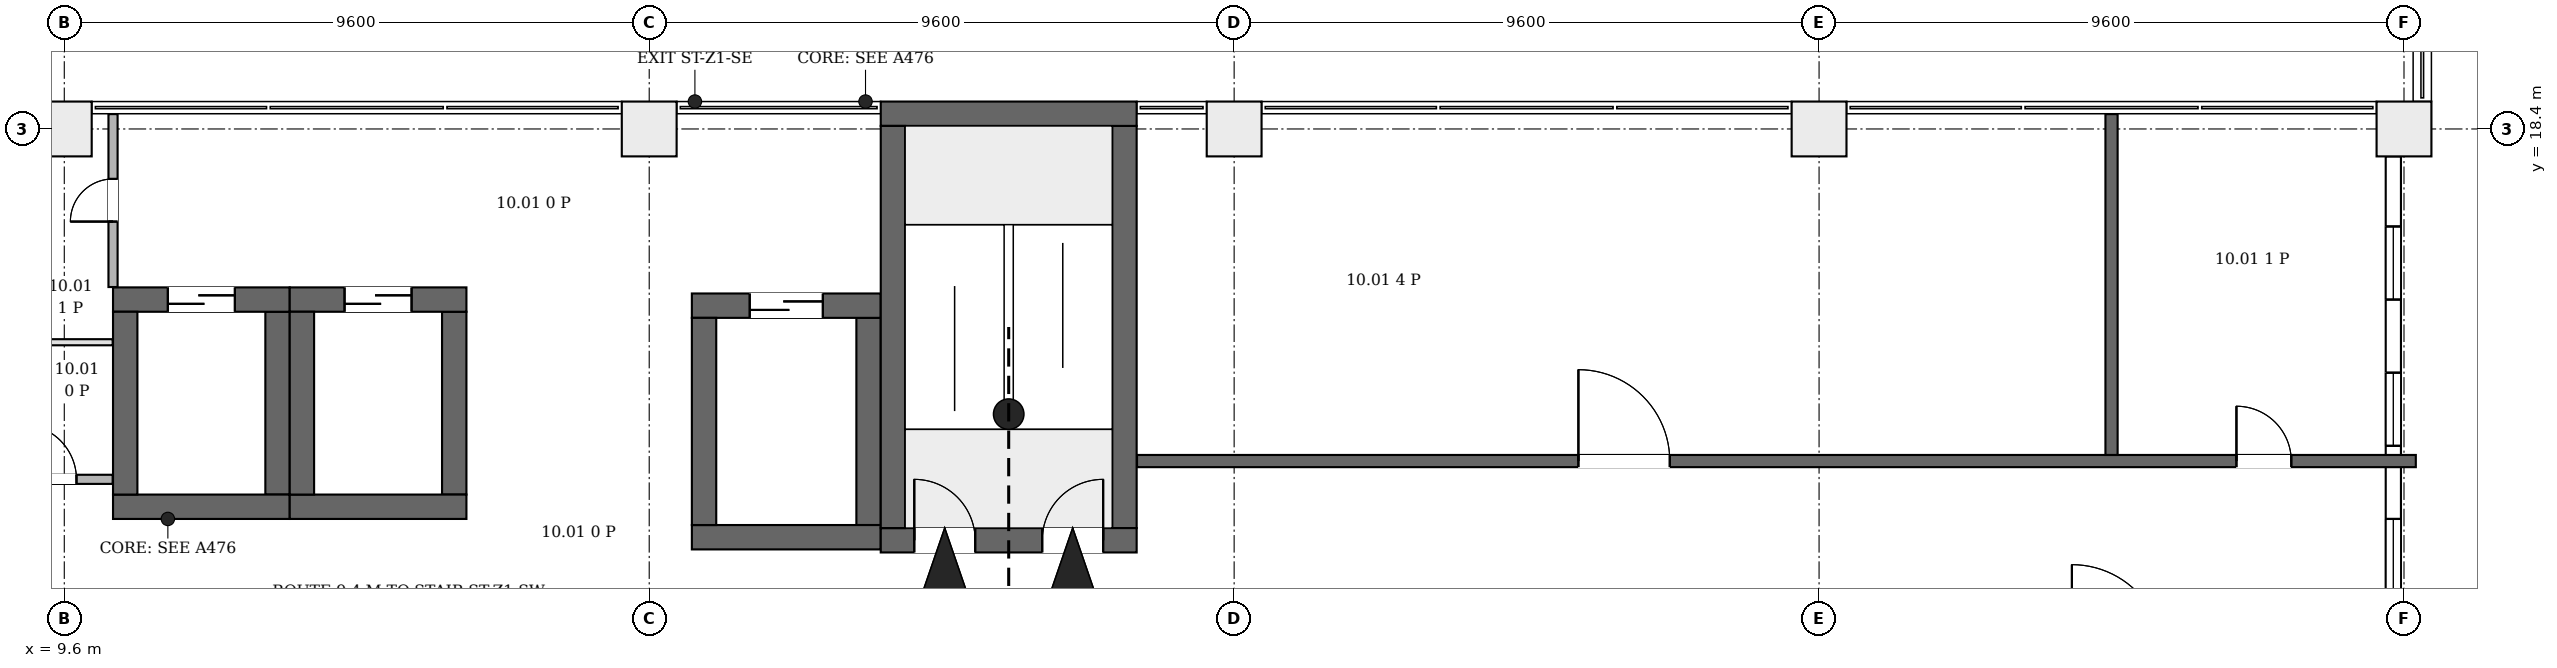
"""IFC4 building model, lengths in metres.
Left out: names, types, materials, properties, quantities, classifications, styles, units other than length and angle.
Written with IfcOpenShell. Run it as: python <this file> out.ifc"""

import sys

from ifc_helpers import new_model, si_unit, direction, frame, frame_2d, origin, origin_2d, place, context, subcontext, project, spatial, rectangle, extrude, element, fill, save


model = new_model("IFC4")
c1 = context("Model", 3, precision=1e-05, world=origin(), true_north=direction((0.0, 1.0)))
c2 = subcontext(c1, "Body", "Model", "MODEL_VIEW")
j1 = project(units=[si_unit("LENGTHUNIT", "METRE"), si_unit("PLANEANGLEUNIT", "RADIAN")], contexts=[c1])
p1 = place(None, origin())
s1 = spatial("IfcSite", under=j1, at=p1, CompositionType="ELEMENT")
p2 = place(p1, origin())
s2 = spatial("IfcBuilding", under=s1, at=p2, CompositionType="ELEMENT")
p3 = place(p2, frame((0.0, 0.0, 52.9)))
s3 = spatial("IfcBuildingStorey", under=s2, at=p3, CompositionType="ELEMENT", Elevation=52.9)
p4 = place(p3, frame((23.0, 11.65, 0.0), z_axis=(0.0, 0.0, 1.0), x_axis=(1.0, 0.0, 0.0)))
e1 = element("IfcWall", 1, at=p4, inside=s3, PredefinedType="SHEAR", context=c2, shape_type="SweptSolid", body=[
    extrude(rectangle(XDim=4.2, YDim=0.4, at=frame_2d((2.1, 0.0))), origin(), (0.0, 0.0, 1.0), 4.2),
])
p5 = place(p4, frame((0.55, 0.0, 0.0)))
e2 = element("IfcOpeningElement", 2, at=p5, cuts=e1, PredefinedType="OPENING", context=c2, shape_type="SweptSolid", body=[
    extrude(rectangle(XDim=1.0, YDim=2.1, at=frame_2d((0.5, 1.05))), frame((0.0, 0.21, 0.0), z_axis=(0.0, -1.0, 0.0), x_axis=(1.0, 0.0, 0.0)), (0.0, 0.0, 1.0), 0.42),
])
p6 = place(p4, frame((2.65, 0.0, 0.0)))
e3 = element("IfcOpeningElement", 3, at=p6, cuts=e1, PredefinedType="OPENING", context=c2, shape_type="SweptSolid", body=[
    extrude(rectangle(XDim=1.0, YDim=2.1, at=frame_2d((0.5, 1.05))), frame((0.0, 0.21, 0.0), z_axis=(0.0, -1.0, 0.0), x_axis=(1.0, 0.0, 0.0)), (0.0, 0.0, 1.0), 0.42),
])
p7 = place(p3, frame((23.0, 18.65, 0.0), z_axis=(0.0, 0.0, 1.0), x_axis=(1.0, 0.0, 0.0)))
e4 = element("IfcWall", 4, at=p7, inside=s3, PredefinedType="SHEAR", context=c2, shape_type="SweptSolid", body=[
    extrude(rectangle(XDim=4.2, YDim=0.4, at=frame_2d((2.1, 0.0))), origin(), (0.0, 0.0, 1.0), 4.2),
])
for number, where, z_axis, x_axis in (
    (5, (23.2, 11.85, 0.0), (0.0, 0.0, 1.0), (0.0, 1.0, 0.0)),
    (6, (27.0, 11.85, 0.0), (0.0, 0.0, 1.0), (0.0, 1.0, 0.0)),
):
    element("IfcWall", number, at=place(p3, frame(where, z_axis=z_axis, x_axis=x_axis)), inside=s3, PredefinedType="SHEAR", context=c2, shape_type="SweptSolid", body=[
        extrude(rectangle(XDim=6.6, YDim=0.4, at=frame_2d((3.3, 0.0))), origin(), (0.0, 0.0, 1.0), 4.2),
    ])
p8 = place(p3, frame((10.4, 12.2, 0.0), z_axis=(0.0, 0.0, 1.0), x_axis=(1.0, 0.0, 0.0)))
e7 = element("IfcWall", 7, at=p8, inside=s3, PredefinedType="SHEAR", context=c2, shape_type="SweptSolid", body=[
    extrude(rectangle(XDim=2.9, YDim=0.4, at=frame_2d((1.45, 0.0))), origin(), (0.0, 0.0, 1.0), 4.2),
])
p9 = place(p3, frame((10.4, 15.6, 0.0), z_axis=(0.0, 0.0, 1.0), x_axis=(1.0, 0.0, 0.0)))
e8 = element("IfcWall", 8, at=p9, inside=s3, PredefinedType="SHEAR", context=c2, shape_type="SweptSolid", body=[
    extrude(rectangle(XDim=2.9, YDim=0.4, at=frame_2d((1.45, 0.0))), origin(), (0.0, 0.0, 1.0), 4.2),
])
p10 = place(p9, frame((0.9, 0.0, 0.0)))
e9 = element("IfcOpeningElement", 9, at=p10, cuts=e8, PredefinedType="OPENING", context=c2, shape_type="SweptSolid", body=[
    extrude(rectangle(XDim=1.1, YDim=2.1, at=frame_2d((0.55, 1.05))), frame((0.0, 0.21, 0.0), z_axis=(0.0, -1.0, 0.0), x_axis=(1.0, 0.0, 0.0)), (0.0, 0.0, 1.0), 0.42),
])
for number, where, z_axis, x_axis in (
    (10, (10.6, 12.4, 0.0), (0.0, 0.0, 1.0), (0.0, 1.0, 0.0)),
    (11, (13.1, 12.4, 0.0), (0.0, 0.0, 1.0), (0.0, 1.0, 0.0)),
):
    element("IfcWall", number, at=place(p3, frame(where, z_axis=z_axis, x_axis=x_axis)), inside=s3, PredefinedType="SHEAR", context=c2, shape_type="SweptSolid", body=[
        extrude(rectangle(XDim=3.0, YDim=0.4, at=frame_2d((1.5, 0.0))), origin(), (0.0, 0.0, 1.0), 4.2),
    ])
p11 = place(p3, frame((13.3, 12.2, 0.0), z_axis=(0.0, 0.0, 1.0), x_axis=(1.0, 0.0, 0.0)))
e12 = element("IfcWall", 12, at=p11, inside=s3, PredefinedType="SHEAR", context=c2, shape_type="SweptSolid", body=[
    extrude(rectangle(XDim=2.9, YDim=0.4, at=frame_2d((1.45, 0.0))), origin(), (0.0, 0.0, 1.0), 4.2),
])
p12 = place(p3, frame((13.3, 15.6, 0.0), z_axis=(0.0, 0.0, 1.0), x_axis=(1.0, 0.0, 0.0)))
e13 = element("IfcWall", 13, at=p12, inside=s3, PredefinedType="SHEAR", context=c2, shape_type="SweptSolid", body=[
    extrude(rectangle(XDim=2.9, YDim=0.4, at=frame_2d((1.45, 0.0))), origin(), (0.0, 0.0, 1.0), 4.2),
])
p13 = place(p12, frame((0.9, 0.0, 0.0)))
e14 = element("IfcOpeningElement", 14, at=p13, cuts=e13, PredefinedType="OPENING", context=c2, shape_type="SweptSolid", body=[
    extrude(rectangle(XDim=1.1, YDim=2.1, at=frame_2d((0.55, 1.05))), frame((0.0, 0.21, 0.0), z_axis=(0.0, -1.0, 0.0), x_axis=(1.0, 0.0, 0.0)), (0.0, 0.0, 1.0), 0.42),
])
for number, where, z_axis, x_axis in (
    (15, (13.5, 12.4, 0.0), (0.0, 0.0, 1.0), (0.0, 1.0, 0.0)),
    (16, (16.0, 12.4, 0.0), (0.0, 0.0, 1.0), (0.0, 1.0, 0.0)),
):
    element("IfcWall", number, at=place(p3, frame(where, z_axis=z_axis, x_axis=x_axis)), inside=s3, PredefinedType="SHEAR", context=c2, shape_type="SweptSolid", body=[
        extrude(rectangle(XDim=3.0, YDim=0.4, at=frame_2d((1.5, 0.0))), origin(), (0.0, 0.0, 1.0), 4.2),
    ])
p14 = place(p3, frame((19.9, 11.7, 0.0), z_axis=(0.0, 0.0, 1.0), x_axis=(1.0, 0.0, 0.0)))
e17 = element("IfcWall", 17, at=p14, inside=s3, PredefinedType="SHEAR", context=c2, shape_type="SweptSolid", body=[
    extrude(rectangle(XDim=3.1, YDim=0.4, at=frame_2d((1.55, 0.0))), origin(), (0.0, 0.0, 1.0), 4.2),
])
p15 = place(p3, frame((19.9, 15.5, 0.0), z_axis=(0.0, 0.0, 1.0), x_axis=(1.0, 0.0, 0.0)))
e18 = element("IfcWall", 18, at=p15, inside=s3, PredefinedType="SHEAR", context=c2, shape_type="SweptSolid", body=[
    extrude(rectangle(XDim=3.1, YDim=0.4, at=frame_2d((1.55, 0.0))), origin(), (0.0, 0.0, 1.0), 4.2),
])
p16 = place(p15, frame((0.95, 0.0, 0.0)))
e19 = element("IfcOpeningElement", 19, at=p16, cuts=e18, PredefinedType="OPENING", context=c2, shape_type="SweptSolid", body=[
    extrude(rectangle(XDim=1.2, YDim=2.1, at=frame_2d((0.6, 1.05))), frame((0.0, 0.21, 0.0), z_axis=(0.0, -1.0, 0.0), x_axis=(1.0, 0.0, 0.0)), (0.0, 0.0, 1.0), 0.42),
])
for number, where, z_axis, x_axis in (
    (20, (20.1, 11.9, 0.0), (0.0, 0.0, 1.0), (0.0, 1.0, 0.0)),
    (21, (22.8, 11.9, 0.0), (0.0, 0.0, 1.0), (0.0, 1.0, 0.0)),
):
    element("IfcWall", number, at=place(p3, frame(where, z_axis=z_axis, x_axis=x_axis)), inside=s3, PredefinedType="SHEAR", context=c2, shape_type="SweptSolid", body=[
        extrude(rectangle(XDim=3.4, YDim=0.4, at=frame_2d((1.7, 0.0))), origin(), (0.0, 0.0, 1.0), 4.2),
    ])
for number, where, z_axis, x_axis in (
    (22, (9.6, 18.4, 0.0), (0.0, 0.0, 1.0), (1.0, 0.0, 0.0)),
    (23, (19.2, 18.4, 0.0), (0.0, 0.0, 1.0), (1.0, 0.0, 0.0)),
    (24, (28.8, 18.4, 0.0), (0.0, 0.0, 1.0), (1.0, 0.0, 0.0)),
    (25, (38.4, 18.4, 0.0), (0.0, 0.0, 1.0), (1.0, 0.0, 0.0)),
    (26, (48.0, 18.4, 0.0), (0.0, 0.0, 1.0), (1.0, 0.0, 0.0)),
):
    element("IfcColumn", number, at=place(p3, frame(where, z_axis=z_axis, x_axis=x_axis)), inside=s3, PredefinedType="COLUMN", context=c2, shape_type="SweptSolid", body=[
        extrude(rectangle(XDim=0.9, YDim=0.9, at=origin_2d()), origin(), (0.0, 0.0, 1.0), 4.2),
    ])
p17 = place(p3, frame((47.825, 9.65, 0.0), z_axis=(0.0, 0.0, 1.0), x_axis=(0.0, 1.0, 0.0)))
e27 = element("IfcWall", 27, at=p17, inside=s3, PredefinedType="ELEMENTEDWALL", context=c2, shape_type="SweptSolid", body=[
    extrude(rectangle(XDim=8.3, YDim=0.25, at=frame_2d((4.15, 0.0))), origin(), (0.0, 0.0, 1.0), 3.3),
])
p18 = place(p17, frame((1.15, 0.0, 0.6)))
e28 = element("IfcOpeningElement", 28, at=p18, cuts=e27, PredefinedType="OPENING", context=c2, shape_type="SweptSolid", body=[
    extrude(rectangle(XDim=1.2, YDim=2.6, at=frame_2d((0.6, 1.3))), frame((0.0, 0.135, 0.0), z_axis=(0.0, -1.0, 0.0), x_axis=(1.0, 0.0, 0.0)), (0.0, 0.0, 1.0), 0.27),
])
p19 = place(p17, frame((3.55, 0.0, 0.6)))
e29 = element("IfcOpeningElement", 29, at=p19, cuts=e27, PredefinedType="OPENING", context=c2, shape_type="SweptSolid", body=[
    extrude(rectangle(XDim=1.2, YDim=2.6, at=frame_2d((0.6, 1.3))), frame((0.0, 0.135, 0.0), z_axis=(0.0, -1.0, 0.0), x_axis=(1.0, 0.0, 0.0)), (0.0, 0.0, 1.0), 0.27),
])
p20 = place(p17, frame((5.95, 0.0, 0.6)))
e30 = element("IfcOpeningElement", 30, at=p20, cuts=e27, PredefinedType="OPENING", context=c2, shape_type="SweptSolid", body=[
    extrude(rectangle(XDim=1.2, YDim=2.6, at=frame_2d((0.6, 1.3))), frame((0.0, 0.135, 0.0), z_axis=(0.0, -1.0, 0.0), x_axis=(1.0, 0.0, 0.0)), (0.0, 0.0, 1.0), 0.27),
])
p21 = place(p3, frame((6.125, 12.65, 0.0), z_axis=(0.0, 0.0, 1.0), x_axis=(1.0, 0.0, 0.0)))
e31 = element("IfcWall", 31, at=p21, inside=s3, PredefinedType="PARTITIONING", context=c2, shape_type="SweptSolid", body=[
    extrude(rectangle(XDim=4.269, YDim=0.15, at=frame_2d((2.135, 0.0))), origin(), (0.0, 0.0, 1.0), 3.9),
])
p22 = place(p21, frame((2.775, 0.0, 0.0)))
e32 = element("IfcOpeningElement", 32, at=p22, cuts=e31, PredefinedType="OPENING", context=c2, shape_type="SweptSolid", body=[
    extrude(rectangle(XDim=0.9, YDim=2.1, at=frame_2d((0.45, 1.05))), frame((0.0, 0.085, 0.0), z_axis=(0.0, -1.0, 0.0), x_axis=(1.0, 0.0, 0.0)), (0.0, 0.0, 1.0), 0.17),
])
p23 = place(p3, frame((6.275, 14.9, 0.0), z_axis=(0.0, 0.0, 1.0), x_axis=(1.0, 0.0, 0.0)))
e33 = element("IfcWall", 33, at=p23, inside=s3, PredefinedType="PARTITIONING", context=c2, shape_type="SweptSolid", body=[
    extrude(rectangle(XDim=4.119, YDim=0.1, at=frame_2d((2.06, 0.0))), origin(), (0.0, 0.0, 1.0), 3.9),
])
p24 = place(p3, frame((10.4, 15.806, 0.0), z_axis=(0.0, 0.0, 1.0), x_axis=(0.0, 1.0, 0.0)))
e34 = element("IfcWall", 34, at=p24, inside=s3, PredefinedType="PARTITIONING", context=c2, shape_type="SweptSolid", body=[
    extrude(rectangle(XDim=2.838, YDim=0.15, at=frame_2d((1.419, 0.0))), origin(), (0.0, 0.0, 1.0), 3.9),
])
p25 = place(p24, frame((1.074, 0.0, 0.0)))
e35 = element("IfcOpeningElement", 35, at=p25, cuts=e34, PredefinedType="OPENING", context=c2, shape_type="SweptSolid", body=[
    extrude(rectangle(XDim=0.7, YDim=2.1, at=frame_2d((0.35, 1.05))), frame((0.0, 0.085, 0.0), z_axis=(0.0, -1.0, 0.0), x_axis=(1.0, 0.0, 0.0)), (0.0, 0.0, 1.0), 0.17),
])
p26 = place(p3, frame((27.206, 12.95, 0.0), z_axis=(0.0, 0.0, 1.0), x_axis=(1.0, 0.0, 0.0)))
e36 = element("IfcWall", 36, at=p26, inside=s3, PredefinedType="PARTITIONING", context=c2, shape_type="SweptSolid", body=[
    extrude(rectangle(XDim=20.988, YDim=0.2, at=frame_2d((10.494, 0.0))), origin(), (0.0, 0.0, 1.0), 3.9),
])
p27 = place(p26, frame((7.244, 0.0, 0.0)))
e37 = element("IfcOpeningElement", 37, at=p27, cuts=e36, PredefinedType="OPENING", context=c2, shape_type="SweptSolid", body=[
    extrude(rectangle(XDim=1.5, YDim=2.1, at=frame_2d((0.75, 1.05))), frame((0.0, 0.11, 0.0), z_axis=(0.0, -1.0, 0.0), x_axis=(1.0, 0.0, 0.0)), (0.0, 0.0, 1.0), 0.22),
])
p28 = place(p26, frame((18.044, 0.0, 0.0)))
e38 = element("IfcOpeningElement", 38, at=p28, cuts=e36, PredefinedType="OPENING", context=c2, shape_type="SweptSolid", body=[
    extrude(rectangle(XDim=0.9, YDim=2.1, at=frame_2d((0.45, 1.05))), frame((0.0, 0.11, 0.0), z_axis=(0.0, -1.0, 0.0), x_axis=(1.0, 0.0, 0.0)), (0.0, 0.0, 1.0), 0.22),
])
p29 = place(p3, frame((43.2, 13.05, 0.0), z_axis=(0.0, 0.0, 1.0), x_axis=(0.0, 1.0, 0.0)))
e39 = element("IfcWall", 39, at=p29, inside=s3, PredefinedType="PARTITIONING", context=c2, shape_type="SweptSolid", body=[
    extrude(rectangle(XDim=5.594, YDim=0.2, at=frame_2d((2.797, 0.0))), origin(), (0.0, 0.0, 1.0), 3.9),
])
p30 = place(p18, origin())
e40 = element("IfcWindow", 40, at=p30, inside=s3, PartitioningType="SINGLE_PANEL", PredefinedType="WINDOW", context=c2, shape_type="SweptSolid", body=[
    extrude(rectangle(XDim=1.2, YDim=2.6, at=frame_2d((0.6, 1.3))), frame((0.0, 0.03, 0.0), z_axis=(0.0, -1.0, 0.0), x_axis=(1.0, 0.0, 0.0)), (0.0, 0.0, 1.0), 0.06),
])
fill(e28, e40)
p31 = place(p19, origin())
e41 = element("IfcWindow", 41, at=p31, inside=s3, PartitioningType="SINGLE_PANEL", PredefinedType="WINDOW", context=c2, shape_type="SweptSolid", body=[
    extrude(rectangle(XDim=1.2, YDim=2.6, at=frame_2d((0.6, 1.3))), frame((0.0, 0.03, 0.0), z_axis=(0.0, -1.0, 0.0), x_axis=(1.0, 0.0, 0.0)), (0.0, 0.0, 1.0), 0.06),
])
fill(e29, e41)
p32 = place(p20, origin())
e42 = element("IfcWindow", 42, at=p32, inside=s3, PartitioningType="SINGLE_PANEL", PredefinedType="WINDOW", context=c2, shape_type="SweptSolid", body=[
    extrude(rectangle(XDim=1.2, YDim=2.6, at=frame_2d((0.6, 1.3))), frame((0.0, 0.03, 0.0), z_axis=(0.0, -1.0, 0.0), x_axis=(1.0, 0.0, 0.0)), (0.0, 0.0, 1.0), 0.06),
])
fill(e30, e42)
p33 = place(p5, origin())
e43 = element("IfcDoor", 43, at=p33, inside=s3, OperationType="SINGLE_SWING_RIGHT", PredefinedType="DOOR", context=c2, shape_type="SweptSolid", body=[
    extrude(rectangle(XDim=1.0, YDim=2.1, at=frame_2d((0.5, 1.05))), frame((0.0, 0.025, 0.0), z_axis=(0.0, -1.0, 0.0), x_axis=(1.0, 0.0, 0.0)), (0.0, 0.0, 1.0), 0.05),
])
fill(e2, e43)
p34 = place(p6, origin())
e44 = element("IfcDoor", 44, at=p34, inside=s3, OperationType="SINGLE_SWING_LEFT", PredefinedType="DOOR", context=c2, shape_type="SweptSolid", body=[
    extrude(rectangle(XDim=1.0, YDim=2.1, at=frame_2d((0.5, 1.05))), frame((0.0, 0.025, 0.0), z_axis=(0.0, -1.0, 0.0), x_axis=(1.0, 0.0, 0.0)), (0.0, 0.0, 1.0), 0.05),
])
fill(e3, e44)
p35 = place(p10, origin())
e45 = element("IfcDoor", 45, at=p35, inside=s3, OperationType="DOUBLE_DOOR_SLIDING", PredefinedType="DOOR", context=c2, shape_type="SweptSolid", body=[
    extrude(rectangle(XDim=1.1, YDim=2.1, at=frame_2d((0.55, 1.05))), frame((0.0, 0.025, 0.0), z_axis=(0.0, -1.0, 0.0), x_axis=(1.0, 0.0, 0.0)), (0.0, 0.0, 1.0), 0.05),
])
fill(e9, e45)
p36 = place(p13, origin())
e46 = element("IfcDoor", 46, at=p36, inside=s3, OperationType="DOUBLE_DOOR_SLIDING", PredefinedType="DOOR", context=c2, shape_type="SweptSolid", body=[
    extrude(rectangle(XDim=1.1, YDim=2.1, at=frame_2d((0.55, 1.05))), frame((0.0, 0.025, 0.0), z_axis=(0.0, -1.0, 0.0), x_axis=(1.0, 0.0, 0.0)), (0.0, 0.0, 1.0), 0.05),
])
fill(e14, e46)
p37 = place(p16, origin())
e47 = element("IfcDoor", 47, at=p37, inside=s3, OperationType="DOUBLE_DOOR_SLIDING", PredefinedType="DOOR", context=c2, shape_type="SweptSolid", body=[
    extrude(rectangle(XDim=1.2, YDim=2.1, at=frame_2d((0.6, 1.05))), frame((0.0, 0.025, 0.0), z_axis=(0.0, -1.0, 0.0), x_axis=(1.0, 0.0, 0.0)), (0.0, 0.0, 1.0), 0.05),
])
fill(e19, e47)
p38 = place(p22, origin())
e48 = element("IfcDoor", 48, at=p38, inside=s3, OperationType="SINGLE_SWING_RIGHT", PredefinedType="DOOR", context=c2, shape_type="SweptSolid", body=[
    extrude(rectangle(XDim=0.9, YDim=2.1, at=frame_2d((0.45, 1.05))), frame((0.0, 0.025, 0.0), z_axis=(0.0, -1.0, 0.0), x_axis=(1.0, 0.0, 0.0)), (0.0, 0.0, 1.0), 0.05),
])
fill(e32, e48)
p39 = place(p25, origin())
e49 = element("IfcDoor", 49, at=p39, inside=s3, OperationType="SINGLE_SWING_LEFT", PredefinedType="DOOR", context=c2, shape_type="SweptSolid", body=[
    extrude(rectangle(XDim=0.7, YDim=2.1, at=frame_2d((0.35, 1.05))), frame((0.0, 0.025, 0.0), z_axis=(0.0, -1.0, 0.0), x_axis=(1.0, 0.0, 0.0)), (0.0, 0.0, 1.0), 0.05),
])
fill(e35, e49)
p40 = place(p27, origin())
e50 = element("IfcDoor", 50, at=p40, inside=s3, OperationType="DOUBLE_DOOR_SINGLE_SWING", PredefinedType="DOOR", context=c2, shape_type="SweptSolid", body=[
    extrude(rectangle(XDim=1.5, YDim=2.1, at=frame_2d((0.75, 1.05))), frame((0.0, 0.025, 0.0), z_axis=(0.0, -1.0, 0.0), x_axis=(1.0, 0.0, 0.0)), (0.0, 0.0, 1.0), 0.05),
])
fill(e37, e50)
p41 = place(p28, origin())
e51 = element("IfcDoor", 51, at=p41, inside=s3, OperationType="SINGLE_SWING_RIGHT", PredefinedType="DOOR", context=c2, shape_type="SweptSolid", body=[
    extrude(rectangle(XDim=0.9, YDim=2.1, at=frame_2d((0.45, 1.05))), frame((0.0, 0.025, 0.0), z_axis=(0.0, -1.0, 0.0), x_axis=(1.0, 0.0, 0.0)), (0.0, 0.0, 1.0), 0.05),
])
fill(e38, e51)
save(model, sys.argv[1])
